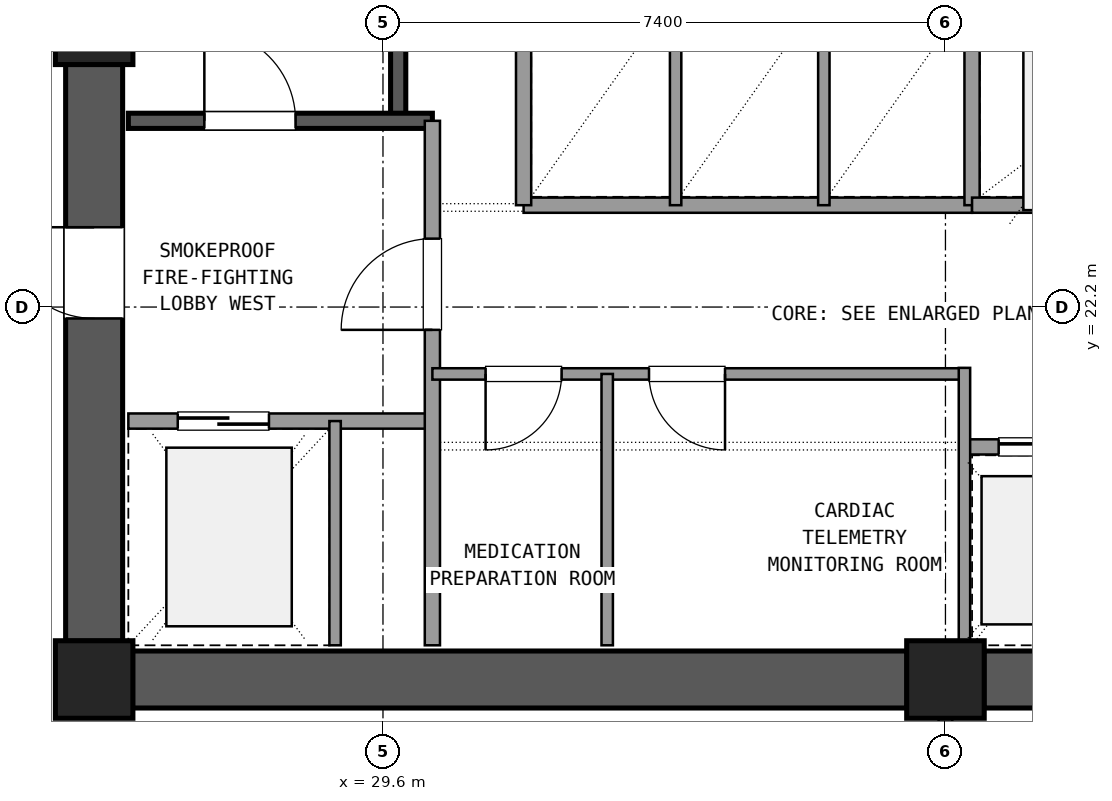
"""IFC4 building model, lengths in metres.
Left out: names, types, materials, properties, quantities, classifications, styles, units other than length and angle.
Written with IfcOpenShell. Run it as: python <this file> out.ifc"""

import sys

from ifc_helpers import new_model, si_unit, direction, frame, frame_2d, origin, origin_2d, place, context, subcontext, project, spatial, rectangle, extrude, element, fill, save


model = new_model("IFC4")
c1 = context("Model", 3, precision=1e-05, world=origin(), true_north=direction((0.0, 1.0)))
c2 = subcontext(c1, "Body", "Model", "MODEL_VIEW")
j1 = project(units=[si_unit("LENGTHUNIT", "METRE"), si_unit("PLANEANGLEUNIT", "RADIAN")], contexts=[c1])
p1 = place(None, origin())
s1 = spatial("IfcSite", under=j1, at=p1, CompositionType="ELEMENT")
p2 = place(p1, origin())
s2 = spatial("IfcBuilding", under=s1, at=p2, CompositionType="ELEMENT")
p3 = place(p2, frame((0.0, 0.0, 117.18)))
s3 = spatial("IfcBuildingStorey", under=s2, at=p3, CompositionType="ELEMENT", Elevation=117.18)
for number, where, z_axis, x_axis in (
    (1, (25.8, 17.3, 0.0), (0.0, 0.0, 1.0), (1.0, 0.0, 0.0)),
    (2, (37.0, 17.3, 0.0), (0.0, 0.0, 1.0), (1.0, 0.0, 0.0)),
    (3, (25.8, 25.9, 0.0), (0.0, 0.0, 1.0), (1.0, 0.0, 0.0)),
):
    element("IfcColumn", number, at=place(p3, frame(where, z_axis=z_axis, x_axis=x_axis)), inside=s3, PredefinedType="COLUMN", context=c2, shape_type="SweptSolid", body=[
        extrude(rectangle(XDim=1.02, YDim=1.02, at=origin_2d()), origin(), (0.0, 0.0, 1.0), 3.6),
    ])
for number, where, z_axis, x_axis in (
    (4, (26.305, 17.3, 0.0), (0.0, 0.0, 1.0), (1.0, 0.0, 0.0)),
    (5, (37.505, 17.3, 0.0), (0.0, 0.0, 1.0), (1.0, 0.0, 0.0)),
):
    element("IfcWall", number, at=place(p3, frame(where, z_axis=z_axis, x_axis=x_axis)), inside=s3, PredefinedType="SHEAR", context=c2, shape_type="SweptSolid", body=[
        extrude(rectangle(XDim=10.19, YDim=0.75, at=frame_2d((5.095, 0.0))), origin(), (0.0, 0.0, 1.0), 3.32),
    ])
p4 = place(p3, frame((25.8, 25.395, 0.0), z_axis=(0.0, 0.0, 1.0), x_axis=(0.0, -1.0, 0.0)))
e6 = element("IfcWall", 6, at=p4, inside=s3, PredefinedType="SHEAR", context=c2, shape_type="SweptSolid", body=[
    extrude(rectangle(XDim=7.59, YDim=0.75, at=frame_2d((3.795, 0.0))), origin(), (0.0, 0.0, 1.0), 3.32),
])
p5 = place(p4, frame((2.145, 0.0, 0.0)))
e7 = element("IfcOpeningElement", 7, at=p5, cuts=e6, PredefinedType="OPENING", context=c2, shape_type="SweptSolid", body=[
    extrude(rectangle(XDim=1.2, YDim=2.15, at=frame_2d((0.6, 1.075))), frame((0.0, 0.385, 0.0), z_axis=(0.0, -1.0, 0.0), x_axis=(1.0, 0.0, 0.0)), (0.0, 0.0, 1.0), 0.77),
])
p6 = place(p3, frame((29.8, 24.65, 0.0), z_axis=(0.0, 0.0, 1.0), x_axis=(0.0, 1.0, 0.0)))
e8 = element("IfcWall", 8, at=p6, inside=s3, PredefinedType="SHEAR", context=c2, shape_type="SweptSolid", body=[
    extrude(rectangle(XDim=9.4, YDim=0.2, at=frame_2d((4.7, 0.0))), origin(), (0.0, 0.0, 1.0), 3.32),
])
p7 = place(p3, frame((26.25, 24.65, 0.0), z_axis=(0.0, 0.0, 1.0), x_axis=(1.0, 0.0, 0.0)))
e9 = element("IfcWall", 9, at=p7, inside=s3, PredefinedType="SHEAR", context=c2, shape_type="SweptSolid", body=[
    extrude(rectangle(XDim=4.0, YDim=0.2, at=frame_2d((2.0, 0.0))), origin(), (0.0, 0.0, 1.0), 3.32),
])
p8 = place(p7, frame((1.0, 0.0, 0.0)))
e10 = element("IfcOpeningElement", 10, at=p8, cuts=e9, PredefinedType="OPENING", context=c2, shape_type="SweptSolid", body=[
    extrude(rectangle(XDim=1.2, YDim=2.15, at=frame_2d((0.6, 1.075))), frame((0.0, 0.11, 0.0), z_axis=(0.0, -1.0, 0.0), x_axis=(1.0, 0.0, 0.0)), (0.0, 0.0, 1.0), 0.22),
])
p9 = place(p3, frame((26.25, 20.7, 0.0), z_axis=(0.0, 0.0, 1.0), x_axis=(1.0, 0.0, 0.0)))
e11 = element("IfcWall", 11, at=p9, inside=s3, PredefinedType="SOLIDWALL", context=c2, shape_type="SweptSolid", body=[
    extrude(rectangle(XDim=4.0, YDim=0.2, at=frame_2d((2.0, 0.0))), origin(), (0.0, 0.0, 1.0), 2.61),
])
p10 = place(p9, frame((0.65, 0.0, 0.0)))
e12 = element("IfcOpeningElement", 12, at=p10, cuts=e11, PredefinedType="OPENING", context=c2, shape_type="SweptSolid", body=[
    extrude(rectangle(XDim=1.2, YDim=2.15, at=frame_2d((0.6, 1.075))), frame((0.0, 0.11, 0.0), z_axis=(0.0, -1.0, 0.0), x_axis=(1.0, 0.0, 0.0)), (0.0, 0.0, 1.0), 0.22),
])
p11 = place(p3, frame((30.25, 17.75, 0.0), z_axis=(0.0, 0.0, 1.0), x_axis=(0.0, 1.0, 0.0)))
e13 = element("IfcWall", 13, at=p11, inside=s3, PredefinedType="SOLIDWALL", context=c2, shape_type="SweptSolid", body=[
    extrude(rectangle(XDim=6.9, YDim=0.2, at=frame_2d((3.45, 0.0))), origin(), (0.0, 0.0, 1.0), 2.61),
])
p12 = place(p11, frame((4.15, 0.0, 0.0)))
e14 = element("IfcOpeningElement", 14, at=p12, cuts=e13, PredefinedType="OPENING", context=c2, shape_type="SweptSolid", body=[
    extrude(rectangle(XDim=1.2, YDim=2.15, at=frame_2d((0.6, 1.075))), frame((0.0, 0.11, 0.0), z_axis=(0.0, -1.0, 0.0), x_axis=(1.0, 0.0, 0.0)), (0.0, 0.0, 1.0), 0.22),
])
p13 = place(p3, frame((28.97, 17.75, 0.0), z_axis=(0.0, 0.0, 1.0), x_axis=(0.0, 1.0, 0.0)))
e15 = element("IfcWall", 15, at=p13, inside=s3, PredefinedType="PARTITIONING", context=c2, shape_type="SweptSolid", body=[
    extrude(rectangle(XDim=2.95, YDim=0.15, at=frame_2d((1.475, 0.0))), origin(), (0.0, 0.0, 1.0), 2.61),
])
p14 = place(p3, frame((30.25, 21.32, 0.0), z_axis=(0.0, 0.0, 1.0), x_axis=(1.0, 0.0, 0.0)))
e16 = element("IfcWall", 16, at=p14, inside=s3, PredefinedType="PARTITIONING", context=c2, shape_type="SweptSolid", body=[
    extrude(rectangle(XDim=7.0, YDim=0.15, at=frame_2d((3.5, 0.0))), origin(), (0.0, 0.0, 1.0), 2.61),
])
p15 = place(p14, frame((0.7, 0.0, 0.0)))
e17 = element("IfcOpeningElement", 17, at=p15, cuts=e16, PredefinedType="OPENING", context=c2, shape_type="SweptSolid", body=[
    extrude(rectangle(XDim=1.0, YDim=2.15, at=frame_2d((0.5, 1.075))), frame((0.0, 0.085, 0.0), z_axis=(0.0, -1.0, 0.0), x_axis=(1.0, 0.0, 0.0)), (0.0, 0.0, 1.0), 0.17),
])
p16 = place(p14, frame((2.85, 0.0, 0.0)))
e18 = element("IfcOpeningElement", 18, at=p16, cuts=e16, PredefinedType="OPENING", context=c2, shape_type="SweptSolid", body=[
    extrude(rectangle(XDim=1.0, YDim=2.15, at=frame_2d((0.5, 1.075))), frame((0.0, 0.085, 0.0), z_axis=(0.0, -1.0, 0.0), x_axis=(1.0, 0.0, 0.0)), (0.0, 0.0, 1.0), 0.17),
])
p17 = place(p3, frame((32.55, 17.75, 0.0), z_axis=(0.0, 0.0, 1.0), x_axis=(0.0, 1.0, 0.0)))
e19 = element("IfcWall", 19, at=p17, inside=s3, PredefinedType="PARTITIONING", context=c2, shape_type="SweptSolid", body=[
    extrude(rectangle(XDim=3.57, YDim=0.15, at=frame_2d((1.785, 0.0))), origin(), (0.0, 0.0, 1.0), 2.61),
])
p18 = place(p3, frame((37.25, 20.36, 0.0), z_axis=(0.0, 0.0, 1.0), x_axis=(1.0, 0.0, 0.0)))
e20 = element("IfcWall", 20, at=p18, inside=s3, PredefinedType="SOLIDWALL", context=c2, shape_type="SweptSolid", body=[
    extrude(rectangle(XDim=6.1, YDim=0.2, at=frame_2d((3.05, 0.0))), origin(), (0.0, 0.0, 1.0), 2.61),
])
p19 = place(p18, frame((0.45, 0.0, 0.0)))
e21 = element("IfcOpeningElement", 21, at=p19, cuts=e20, PredefinedType="OPENING", context=c2, shape_type="SweptSolid", body=[
    extrude(rectangle(XDim=1.1, YDim=2.15, at=frame_2d((0.55, 1.075))), frame((0.0, 0.11, 0.0), z_axis=(0.0, -1.0, 0.0), x_axis=(1.0, 0.0, 0.0)), (0.0, 0.0, 1.0), 0.22),
])
p20 = place(p18, frame((2.5, 0.0, 0.0)))
e22 = element("IfcOpeningElement", 22, at=p20, cuts=e20, PredefinedType="OPENING", context=c2, shape_type="SweptSolid", body=[
    extrude(rectangle(XDim=1.1, YDim=2.15, at=frame_2d((0.55, 1.075))), frame((0.0, 0.11, 0.0), z_axis=(0.0, -1.0, 0.0), x_axis=(1.0, 0.0, 0.0)), (0.0, 0.0, 1.0), 0.22),
])
p21 = place(p18, frame((4.55, 0.0, 0.0)))
e23 = element("IfcOpeningElement", 23, at=p21, cuts=e20, PredefinedType="OPENING", context=c2, shape_type="SweptSolid", body=[
    extrude(rectangle(XDim=1.1, YDim=2.15, at=frame_2d((0.55, 1.075))), frame((0.0, 0.11, 0.0), z_axis=(0.0, -1.0, 0.0), x_axis=(1.0, 0.0, 0.0)), (0.0, 0.0, 1.0), 0.22),
])
p22 = place(p3, frame((37.25, 17.75, 0.0), z_axis=(0.0, 0.0, 1.0), x_axis=(0.0, 1.0, 0.0)))
e24 = element("IfcWall", 24, at=p22, inside=s3, PredefinedType="PARTITIONING", context=c2, shape_type="SweptSolid", body=[
    extrude(rectangle(XDim=3.65, YDim=0.15, at=frame_2d((1.825, 0.0))), origin(), (0.0, 0.0, 1.0), 2.61),
])
p23 = place(p3, frame((31.45, 23.54, 0.0), z_axis=(0.0, 0.0, 1.0), x_axis=(1.0, 0.0, 0.0)))
e25 = element("IfcWall", 25, at=p23, inside=s3, PredefinedType="SOLIDWALL", context=c2, shape_type="SweptSolid", body=[
    extrude(rectangle(XDim=5.9, YDim=0.2, at=frame_2d((2.95, 0.0))), origin(), (0.0, 0.0, 1.0), 2.61),
])
p24 = place(p3, frame((31.45, 23.54, 0.0), z_axis=(0.0, 0.0, 1.0), x_axis=(0.0, 1.0, 0.0)))
e26 = element("IfcWall", 26, at=p24, inside=s3, PredefinedType="SOLIDWALL", context=c2, shape_type="SweptSolid", body=[
    extrude(rectangle(XDim=2.81, YDim=0.2, at=frame_2d((1.405, 0.0))), origin(), (0.0, 0.0, 1.0), 2.61),
])
for number, where, z_axis, x_axis in (
    (27, (33.45, 23.54, 0.0), (0.0, 0.0, 1.0), (0.0, 1.0, 0.0)),
    (28, (35.4, 23.54, 0.0), (0.0, 0.0, 1.0), (0.0, 1.0, 0.0)),
):
    element("IfcWall", number, at=place(p3, frame(where, z_axis=z_axis, x_axis=x_axis)), inside=s3, PredefinedType="PARTITIONING", context=c2, shape_type="SweptSolid", body=[
        extrude(rectangle(XDim=2.81, YDim=0.15, at=frame_2d((1.405, 0.0))), origin(), (0.0, 0.0, 1.0), 2.61),
    ])
p25 = place(p3, frame((37.35, 23.54, 0.0), z_axis=(0.0, 0.0, 1.0), x_axis=(0.0, 1.0, 0.0)))
e29 = element("IfcWall", 29, at=p25, inside=s3, PredefinedType="SOLIDWALL", context=c2, shape_type="SweptSolid", body=[
    extrude(rectangle(XDim=6.82, YDim=0.2, at=frame_2d((3.41, 0.0))), origin(), (0.0, 0.0, 1.0), 2.61),
])
p26 = place(p3, frame((37.35, 23.54, 0.0), z_axis=(0.0, 0.0, 1.0), x_axis=(1.0, 0.0, 0.0)))
e30 = element("IfcWall", 30, at=p26, inside=s3, PredefinedType="SOLIDWALL", context=c2, shape_type="SweptSolid", body=[
    extrude(rectangle(XDim=3.05, YDim=0.2, at=frame_2d((1.525, 0.0))), origin(), (0.0, 0.0, 1.0), 2.61),
])
p27 = place(p3, frame((37.0, 13.64, 0.0), z_axis=(0.0, 0.0, 1.0), x_axis=(0.0, 1.0, 0.0)))
e31 = element("IfcWall", 31, at=p27, inside=s3, PredefinedType="PARTITIONING", context=c2, shape_type="SweptSolid", body=[
    extrude(rectangle(XDim=3.21, YDim=0.18, at=frame_2d((1.605, 0.0))), origin(), (0.0, 0.0, 1.0), 2.61),
])
p28 = place(p27, frame((0.605, 0.0, 0.0)))
e32 = element("IfcOpeningElement", 32, at=p28, cuts=e31, PredefinedType="OPENING", context=c2, shape_type="SweptSolid", body=[
    extrude(rectangle(XDim=2.0, YDim=2.2, at=frame_2d((1.0, 1.1))), frame((0.0, 0.1, 0.0), z_axis=(0.0, -1.0, 0.0), x_axis=(1.0, 0.0, 0.0)), (0.0, 0.0, 1.0), 0.2),
])
p29 = place(p8, origin())
e33 = element("IfcDoor", 33, at=p29, inside=s3, OperationType="SINGLE_SWING_LEFT", PredefinedType="DOOR", context=c2, shape_type="SweptSolid", body=[
    extrude(rectangle(XDim=1.2, YDim=2.15, at=frame_2d((0.6, 1.075))), frame((0.0, 0.025, 0.0), z_axis=(0.0, -1.0, 0.0), x_axis=(1.0, 0.0, 0.0)), (0.0, 0.0, 1.0), 0.05),
])
fill(e10, e33)
p30 = place(p10, origin())
e34 = element("IfcDoor", 34, at=p30, inside=s3, OperationType="SLIDING_TO_LEFT", PredefinedType="DOOR", context=c2, shape_type="SweptSolid", body=[
    extrude(rectangle(XDim=1.2, YDim=2.15, at=frame_2d((0.6, 1.075))), frame((0.0, 0.025, 0.0), z_axis=(0.0, -1.0, 0.0), x_axis=(1.0, 0.0, 0.0)), (0.0, 0.0, 1.0), 0.05),
])
fill(e12, e34)
p31 = place(p12, origin())
e35 = element("IfcDoor", 35, at=p31, inside=s3, OperationType="SINGLE_SWING_LEFT", PredefinedType="DOOR", context=c2, shape_type="SweptSolid", body=[
    extrude(rectangle(XDim=1.2, YDim=2.15, at=frame_2d((0.6, 1.075))), frame((0.0, 0.025, 0.0), z_axis=(0.0, -1.0, 0.0), x_axis=(1.0, 0.0, 0.0)), (0.0, 0.0, 1.0), 0.05),
])
fill(e14, e35)
p32 = place(p5, frame((1.2, 0.0, 0.0), z_axis=(0.0, 0.0, 1.0), x_axis=(-1.0, 0.0, 0.0)))
e36 = element("IfcDoor", 36, at=p32, inside=s3, OperationType="SINGLE_SWING_LEFT", PredefinedType="DOOR", context=c2, shape_type="SweptSolid", body=[
    extrude(rectangle(XDim=1.2, YDim=2.15, at=frame_2d((0.6, 1.075))), frame((0.0, 0.025, 0.0), z_axis=(0.0, -1.0, 0.0), x_axis=(1.0, 0.0, 0.0)), (0.0, 0.0, 1.0), 0.05),
])
fill(e7, e36)
p33 = place(p15, frame((1.0, 0.0, 0.0), z_axis=(0.0, 0.0, 1.0), x_axis=(-1.0, 0.0, 0.0)))
e37 = element("IfcDoor", 37, at=p33, inside=s3, OperationType="SINGLE_SWING_LEFT", PredefinedType="DOOR", context=c2, shape_type="SweptSolid", body=[
    extrude(rectangle(XDim=1.0, YDim=2.15, at=frame_2d((0.5, 1.075))), frame((0.0, 0.025, 0.0), z_axis=(0.0, -1.0, 0.0), x_axis=(1.0, 0.0, 0.0)), (0.0, 0.0, 1.0), 0.05),
])
fill(e17, e37)
p34 = place(p16, frame((1.0, 0.0, 0.0), z_axis=(0.0, 0.0, 1.0), x_axis=(-1.0, 0.0, 0.0)))
e38 = element("IfcDoor", 38, at=p34, inside=s3, OperationType="SINGLE_SWING_RIGHT", PredefinedType="DOOR", context=c2, shape_type="SweptSolid", body=[
    extrude(rectangle(XDim=1.0, YDim=2.15, at=frame_2d((0.5, 1.075))), frame((0.0, 0.025, 0.0), z_axis=(0.0, -1.0, 0.0), x_axis=(1.0, 0.0, 0.0)), (0.0, 0.0, 1.0), 0.05),
])
fill(e18, e38)
p35 = place(p19, origin())
e39 = element("IfcDoor", 39, at=p35, inside=s3, OperationType="SLIDING_TO_LEFT", PredefinedType="DOOR", context=c2, shape_type="SweptSolid", body=[
    extrude(rectangle(XDim=1.1, YDim=2.15, at=frame_2d((0.55, 1.075))), frame((0.0, 0.025, 0.0), z_axis=(0.0, -1.0, 0.0), x_axis=(1.0, 0.0, 0.0)), (0.0, 0.0, 1.0), 0.05),
])
fill(e21, e39)
save(model, sys.argv[1])
